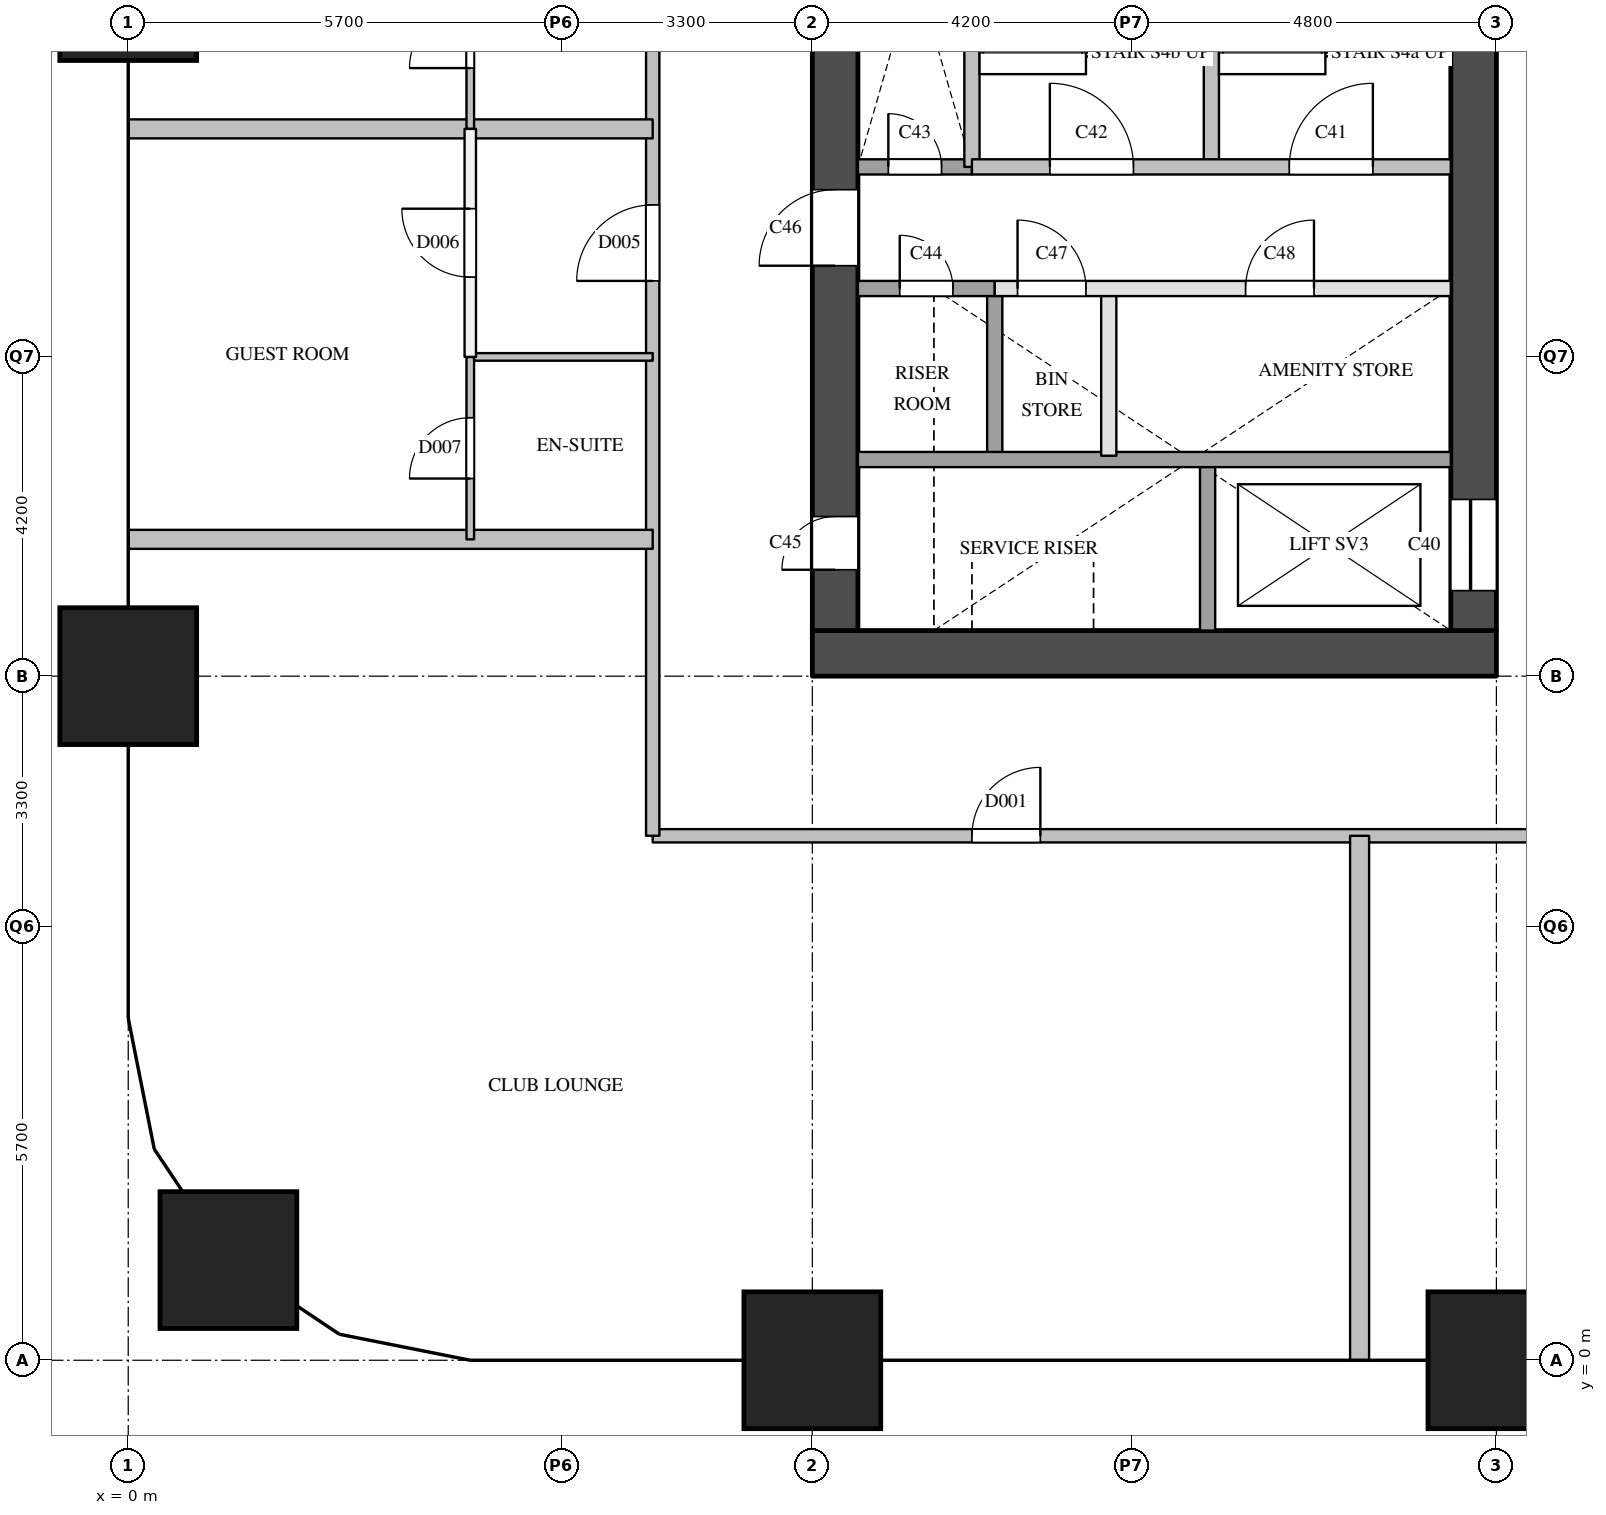
"""IFC4 building model, lengths in metres.
Left out: names, types, materials, properties, quantities, classifications, styles, units other than length and angle.
Written with IfcOpenShell. Run it as: python <this file> out.ifc"""

import sys

from ifc_helpers import new_model, si_unit, direction, frame, frame_2d, origin, origin_2d, place, context, subcontext, project, spatial, rectangle, extrude, element, fill, save


model = new_model("IFC4")
c1 = context("Model", 3, precision=1e-05, world=origin(), true_north=direction((0.0, 1.0)))
c2 = subcontext(c1, "Body", "Model", "MODEL_VIEW")
j1 = project(units=[si_unit("LENGTHUNIT", "METRE"), si_unit("PLANEANGLEUNIT", "RADIAN")], contexts=[c1])
p1 = place(None, origin())
s1 = spatial("IfcSite", under=j1, at=p1, CompositionType="ELEMENT")
p2 = place(p1, origin())
s2 = spatial("IfcBuilding", under=s1, at=p2, CompositionType="ELEMENT")
p3 = place(p2, frame((0.0, 0.0, 61.4)))
s3 = spatial("IfcBuildingStorey", under=s2, at=p3, CompositionType="ELEMENT", Elevation=61.4)
for number, where, z_axis, x_axis in (
    (1, (1.318, 1.318, 0.0), (0.0, 0.0, 1.0), (1.0, 0.0, 0.0)),
    (2, (0.0, 9.0, 0.0), (0.0, 0.0, 1.0), (1.0, 0.0, 0.0)),
    (3, (0.0, 18.0, 0.0), (0.0, 0.0, 1.0), (1.0, 0.0, 0.0)),
    (4, (9.0, 0.0, 0.0), (0.0, 0.0, 1.0), (1.0, 0.0, 0.0)),
    (5, (18.0, 0.0, 0.0), (0.0, 0.0, 1.0), (1.0, 0.0, 0.0)),
):
    element("IfcColumn", number, at=place(p3, frame(where, z_axis=z_axis, x_axis=x_axis)), inside=s3, PredefinedType="COLUMN", context=c2, shape_type="SweptSolid", body=[
        extrude(rectangle(XDim=1.8, YDim=1.8, at=origin_2d()), origin(), (0.0, 0.0, 1.0), 3.8),
    ])
p4 = place(p3, frame((9.0, 9.3, 0.0), z_axis=(0.0, 0.0, 1.0), x_axis=(1.0, 0.0, 0.0)))
e6 = element("IfcWall", 6, at=p4, inside=s3, PredefinedType="SHEAR", context=c2, shape_type="SweptSolid", body=[
    extrude(rectangle(XDim=9.0, YDim=0.6, at=frame_2d((4.5, 0.0))), origin(), (0.0, 0.0, 1.0), 3.5),
])
p5 = place(p3, frame((9.3, 9.6, 0.0), z_axis=(0.0, 0.0, 1.0), x_axis=(0.0, 1.0, 0.0)))
e7 = element("IfcWall", 7, at=p5, inside=s3, PredefinedType="SHEAR", context=c2, shape_type="SweptSolid", body=[
    extrude(rectangle(XDim=12.3, YDim=0.6, at=frame_2d((6.15, 0.0))), origin(), (0.0, 0.0, 1.0), 3.5),
])
p6 = place(p5, frame((0.8, 0.0, 0.0)))
e8 = element("IfcOpeningElement", 8, at=p6, cuts=e7, PredefinedType="OPENING", context=c2, shape_type="SweptSolid", body=[
    extrude(rectangle(XDim=0.7, YDim=2.1, at=frame_2d((0.35, 1.05))), frame((0.0, 0.31, 0.0), z_axis=(0.0, -1.0, 0.0), x_axis=(1.0, 0.0, 0.0)), (0.0, 0.0, 1.0), 0.62),
])
p7 = place(p5, frame((4.8, 0.0, 0.0)))
e9 = element("IfcOpeningElement", 9, at=p7, cuts=e7, PredefinedType="OPENING", context=c2, shape_type="SweptSolid", body=[
    extrude(rectangle(XDim=1.0, YDim=2.1, at=frame_2d((0.5, 1.05))), frame((0.0, 0.31, 0.0), z_axis=(0.0, -1.0, 0.0), x_axis=(1.0, 0.0, 0.0)), (0.0, 0.0, 1.0), 0.62),
])
p8 = place(p3, frame((17.7, 9.6, 0.0), z_axis=(0.0, 0.0, 1.0), x_axis=(0.0, 1.0, 0.0)))
e10 = element("IfcWall", 10, at=p8, inside=s3, PredefinedType="SHEAR", context=c2, shape_type="SweptSolid", body=[
    extrude(rectangle(XDim=12.3, YDim=0.6, at=frame_2d((6.15, 0.0))), origin(), (0.0, 0.0, 1.0), 3.5),
])
p9 = place(p8, frame((0.525, 0.0, 0.0)))
e11 = element("IfcOpeningElement", 11, at=p9, cuts=e10, PredefinedType="OPENING", context=c2, shape_type="SweptSolid", body=[
    extrude(rectangle(XDim=1.2, YDim=2.1, at=frame_2d((0.6, 1.05))), frame((0.0, 0.31, 0.0), z_axis=(0.0, -1.0, 0.0), x_axis=(1.0, 0.0, 0.0)), (0.0, 0.0, 1.0), 0.62),
])
p10 = place(p3, frame((11.1, 15.7, 0.0), z_axis=(0.0, 0.0, 1.0), x_axis=(0.0, 1.0, 0.0)))
e12 = element("IfcWall", 12, at=p10, inside=s3, PredefinedType="SOLIDWALL", context=c2, shape_type="SweptSolid", body=[
    extrude(rectangle(XDim=4.3, YDim=0.2, at=frame_2d((2.15, 0.0))), origin(), (0.0, 0.0, 1.0), 3.5),
])
p11 = place(p3, frame((11.4, 11.9, 0.0), z_axis=(0.0, 0.0, 1.0), x_axis=(0.0, 1.0, 0.0)))
e13 = element("IfcWall", 13, at=p11, inside=s3, PredefinedType="SOLIDWALL", context=c2, shape_type="SweptSolid", body=[
    extrude(rectangle(XDim=2.2, YDim=0.2, at=frame_2d((1.1, 0.0))), origin(), (0.0, 0.0, 1.0), 3.5),
])
p12 = place(p3, frame((12.9, 11.9, 0.0), z_axis=(0.0, 0.0, 1.0), x_axis=(0.0, 1.0, 0.0)))
e14 = element("IfcWall", 14, at=p12, inside=s3, PredefinedType="PARTITIONING", context=c2, shape_type="SweptSolid", body=[
    extrude(rectangle(XDim=2.2, YDim=0.2, at=frame_2d((1.1, 0.0))), origin(), (0.0, 0.0, 1.0), 3.5),
])
p13 = place(p3, frame((14.2, 9.6, 0.0), z_axis=(0.0, 0.0, 1.0), x_axis=(0.0, 1.0, 0.0)))
e15 = element("IfcWall", 15, at=p13, inside=s3, PredefinedType="SOLIDWALL", context=c2, shape_type="SweptSolid", body=[
    extrude(rectangle(XDim=2.3, YDim=0.2, at=frame_2d((1.15, 0.0))), origin(), (0.0, 0.0, 1.0), 3.5),
])
p14 = place(p3, frame((14.25, 15.7, 0.0), z_axis=(0.0, 0.0, 1.0), x_axis=(0.0, 1.0, 0.0)))
e16 = element("IfcWall", 16, at=p14, inside=s3, PredefinedType="SOLIDWALL", context=c2, shape_type="SweptSolid", body=[
    extrude(rectangle(XDim=4.3, YDim=0.2, at=frame_2d((2.15, 0.0))), origin(), (0.0, 0.0, 1.0), 3.5),
])
p15 = place(p3, frame((9.6, 11.85, 0.0), z_axis=(0.0, 0.0, 1.0), x_axis=(1.0, 0.0, 0.0)))
e17 = element("IfcWall", 17, at=p15, inside=s3, PredefinedType="SOLIDWALL", context=c2, shape_type="SweptSolid", body=[
    extrude(rectangle(XDim=7.8, YDim=0.2, at=frame_2d((3.9, 0.0))), origin(), (0.0, 0.0, 1.0), 3.5),
])
p16 = place(p3, frame((11.4, 14.1, 0.0), z_axis=(0.0, 0.0, 1.0), x_axis=(1.0, 0.0, 0.0)))
e18 = element("IfcWall", 18, at=p16, inside=s3, PredefinedType="PARTITIONING", context=c2, shape_type="SweptSolid", body=[
    extrude(rectangle(XDim=6.0, YDim=0.2, at=frame_2d((3.0, 0.0))), origin(), (0.0, 0.0, 1.0), 3.5),
])
p17 = place(p16, frame((0.3, 0.0, 0.0)))
e19 = element("IfcOpeningElement", 19, at=p17, cuts=e18, PredefinedType="OPENING", context=c2, shape_type="SweptSolid", body=[
    extrude(rectangle(XDim=0.9, YDim=2.1, at=frame_2d((0.45, 1.05))), frame((0.0, 0.11, 0.0), z_axis=(0.0, -1.0, 0.0), x_axis=(1.0, 0.0, 0.0)), (0.0, 0.0, 1.0), 0.22),
])
p18 = place(p16, frame((3.3, 0.0, 0.0)))
e20 = element("IfcOpeningElement", 20, at=p18, cuts=e18, PredefinedType="OPENING", context=c2, shape_type="SweptSolid", body=[
    extrude(rectangle(XDim=0.9, YDim=2.1, at=frame_2d((0.45, 1.05))), frame((0.0, 0.11, 0.0), z_axis=(0.0, -1.0, 0.0), x_axis=(1.0, 0.0, 0.0)), (0.0, 0.0, 1.0), 0.22),
])
p19 = place(p3, frame((9.6, 14.1, 0.0), z_axis=(0.0, 0.0, 1.0), x_axis=(1.0, 0.0, 0.0)))
e21 = element("IfcWall", 21, at=p19, inside=s3, PredefinedType="SOLIDWALL", context=c2, shape_type="SweptSolid", body=[
    extrude(rectangle(XDim=1.8, YDim=0.2, at=frame_2d((0.9, 0.0))), origin(), (0.0, 0.0, 1.0), 3.5),
])
p20 = place(p19, frame((0.55, 0.0, 0.0)))
e22 = element("IfcOpeningElement", 22, at=p20, cuts=e21, PredefinedType="OPENING", context=c2, shape_type="SweptSolid", body=[
    extrude(rectangle(XDim=0.7, YDim=2.1, at=frame_2d((0.35, 1.05))), frame((0.0, 0.11, 0.0), z_axis=(0.0, -1.0, 0.0), x_axis=(1.0, 0.0, 0.0)), (0.0, 0.0, 1.0), 0.22),
])
p21 = place(p3, frame((9.6, 15.7, 0.0), z_axis=(0.0, 0.0, 1.0), x_axis=(1.0, 0.0, 0.0)))
e23 = element("IfcWall", 23, at=p21, inside=s3, PredefinedType="SOLIDWALL", context=c2, shape_type="SweptSolid", body=[
    extrude(rectangle(XDim=1.5, YDim=0.2, at=frame_2d((0.75, 0.0))), origin(), (0.0, 0.0, 1.0), 3.5),
])
p22 = place(p21, frame((0.4, 0.0, 0.0)))
e24 = element("IfcOpeningElement", 24, at=p22, cuts=e23, PredefinedType="OPENING", context=c2, shape_type="SweptSolid", body=[
    extrude(rectangle(XDim=0.7, YDim=2.1, at=frame_2d((0.35, 1.05))), frame((0.0, 0.11, 0.0), z_axis=(0.0, -1.0, 0.0), x_axis=(1.0, 0.0, 0.0)), (0.0, 0.0, 1.0), 0.22),
])
p23 = place(p3, frame((11.1, 15.7, 0.0), z_axis=(0.0, 0.0, 1.0), x_axis=(1.0, 0.0, 0.0)))
e25 = element("IfcWall", 25, at=p23, inside=s3, PredefinedType="SOLIDWALL", context=c2, shape_type="SweptSolid", body=[
    extrude(rectangle(XDim=6.3, YDim=0.2, at=frame_2d((3.15, 0.0))), origin(), (0.0, 0.0, 1.0), 3.5),
])
p24 = place(p23, frame((4.175, 0.0, 0.0)))
e26 = element("IfcOpeningElement", 26, at=p24, cuts=e25, PredefinedType="OPENING", context=c2, shape_type="SweptSolid", body=[
    extrude(rectangle(XDim=1.1, YDim=2.1, at=frame_2d((0.55, 1.05))), frame((0.0, 0.11, 0.0), z_axis=(0.0, -1.0, 0.0), x_axis=(1.0, 0.0, 0.0)), (0.0, 0.0, 1.0), 0.22),
])
p25 = place(p23, frame((1.025, 0.0, 0.0)))
e27 = element("IfcOpeningElement", 27, at=p25, cuts=e25, PredefinedType="OPENING", context=c2, shape_type="SweptSolid", body=[
    extrude(rectangle(XDim=1.1, YDim=2.1, at=frame_2d((0.55, 1.05))), frame((0.0, 0.11, 0.0), z_axis=(0.0, -1.0, 0.0), x_axis=(1.0, 0.0, 0.0)), (0.0, 0.0, 1.0), 0.22),
])
p26 = place(p3, frame((6.9, 6.9, 0.0), z_axis=(0.0, 0.0, 1.0), x_axis=(1.0, 0.0, 0.0)))
e28 = element("IfcWall", 28, at=p26, inside=s3, PredefinedType="PARTITIONING", context=c2, shape_type="SweptSolid", body=[
    extrude(rectangle(XDim=13.2, YDim=0.175, at=frame_2d((6.6, 0.0))), origin(), (0.0, 0.0, 1.0), 3.5),
])
p27 = place(p26, frame((4.2, 0.0, 0.0)))
e29 = element("IfcOpeningElement", 29, at=p27, cuts=e28, PredefinedType="OPENING", context=c2, shape_type="SweptSolid", body=[
    extrude(rectangle(XDim=0.9, YDim=2.1, at=frame_2d((0.45, 1.05))), frame((0.0, 0.097, 0.0), z_axis=(0.0, -1.0, 0.0), x_axis=(1.0, 0.0, 0.0)), (0.0, 0.0, 1.0), 0.195),
])
p28 = place(p3, frame((6.9, 6.9, 0.0), z_axis=(0.0, 0.0, 1.0), x_axis=(0.0, 1.0, 0.0)))
e30 = element("IfcWall", 30, at=p28, inside=s3, PredefinedType="PARTITIONING", context=c2, shape_type="SweptSolid", body=[
    extrude(rectangle(XDim=17.09, YDim=0.175, at=frame_2d((8.545, 0.0))), origin(), (0.0, 0.0, 1.0), 3.5),
])
p29 = place(p28, frame((7.3, 0.0, 0.0)))
e31 = element("IfcOpeningElement", 31, at=p29, cuts=e30, PredefinedType="OPENING", context=c2, shape_type="SweptSolid", body=[
    extrude(rectangle(XDim=1.0, YDim=2.1, at=frame_2d((0.5, 1.05))), frame((0.0, 0.097, 0.0), z_axis=(0.0, -1.0, 0.0), x_axis=(1.0, 0.0, 0.0)), (0.0, 0.0, 1.0), 0.195),
])
p30 = place(p28, frame((13.895, 0.0, 0.0)))
e32 = element("IfcOpeningElement", 32, at=p30, cuts=e30, PredefinedType="OPENING", context=c2, shape_type="SweptSolid", body=[
    extrude(rectangle(XDim=1.0, YDim=2.1, at=frame_2d((0.5, 1.05))), frame((0.0, 0.097, 0.0), z_axis=(0.0, -1.0, 0.0), x_axis=(1.0, 0.0, 0.0)), (0.0, 0.0, 1.0), 0.195),
])
p31 = place(p3, frame((4.5, 13.2, 0.0), z_axis=(0.0, 0.0, 1.0), x_axis=(0.0, 1.0, 0.0)))
e33 = element("IfcWall", 33, at=p31, inside=s3, PredefinedType="PARTITIONING", context=c2, shape_type="SweptSolid", body=[
    extrude(rectangle(XDim=3.0, YDim=0.15, at=frame_2d((1.5, 0.0))), origin(), (0.0, 0.0, 1.0), 3.5),
])
p32 = place(p31, frame((1.05, 0.0, 0.0)))
e34 = element("IfcOpeningElement", 34, at=p32, cuts=e33, PredefinedType="OPENING", context=c2, shape_type="SweptSolid", body=[
    extrude(rectangle(XDim=0.9, YDim=2.1, at=frame_2d((0.45, 1.05))), frame((0.0, 0.085, 0.0), z_axis=(0.0, -1.0, 0.0), x_axis=(1.0, 0.0, 0.0)), (0.0, 0.0, 1.0), 0.17),
])
for number, where, z_axis, x_axis in (
    (35, (0.0, 10.8, 0.0), (0.0, 0.0, 1.0), (1.0, 0.0, 0.0)),
    (36, (0.0, 16.2, 0.0), (0.0, 0.0, 1.0), (1.0, 0.0, 0.0)),
    (37, (16.2, 0.0, 0.0), (0.0, 0.0, 1.0), (0.0, 1.0, 0.0)),
):
    element("IfcWall", number, at=place(p3, frame(where, z_axis=z_axis, x_axis=x_axis)), inside=s3, PredefinedType="PARTITIONING", context=c2, shape_type="SweptSolid", body=[
        extrude(rectangle(XDim=6.9, YDim=0.25, at=frame_2d((3.45, 0.0))), origin(), (0.0, 0.0, 1.0), 2.5),
    ])
p33 = place(p3, frame((4.5, 13.2, 0.0), z_axis=(0.0, 0.0, 1.0), x_axis=(1.0, 0.0, 0.0)))
e38 = element("IfcWall", 38, at=p33, inside=s3, PredefinedType="PARTITIONING", context=c2, shape_type="SweptSolid", body=[
    extrude(rectangle(XDim=2.4, YDim=0.1, at=frame_2d((1.2, 0.0))), origin(), (0.0, 0.0, 1.0), 3.5),
])
p34 = place(p3, frame((4.5, 10.8, 0.0), z_axis=(0.0, 0.0, 1.0), x_axis=(0.0, 1.0, 0.0)))
e39 = element("IfcWall", 39, at=p34, inside=s3, PredefinedType="PARTITIONING", context=c2, shape_type="SweptSolid", body=[
    extrude(rectangle(XDim=2.4, YDim=0.1, at=frame_2d((1.2, 0.0))), origin(), (0.0, 0.0, 1.0), 3.5),
])
p35 = place(p34, frame((0.8, 0.0, 0.0)))
e40 = element("IfcOpeningElement", 40, at=p35, cuts=e39, PredefinedType="OPENING", context=c2, shape_type="SweptSolid", body=[
    extrude(rectangle(XDim=0.8, YDim=2.1, at=frame_2d((0.4, 1.05))), frame((0.0, 0.06, 0.0), z_axis=(0.0, -1.0, 0.0), x_axis=(1.0, 0.0, 0.0)), (0.0, 0.0, 1.0), 0.12),
])
p36 = place(p3, frame((4.5, 16.2, 0.0), z_axis=(0.0, 0.0, 1.0), x_axis=(0.0, 1.0, 0.0)))
e41 = element("IfcWall", 41, at=p36, inside=s3, PredefinedType="PARTITIONING", context=c2, shape_type="SweptSolid", body=[
    extrude(rectangle(XDim=2.4, YDim=0.1, at=frame_2d((1.2, 0.0))), origin(), (0.0, 0.0, 1.0), 3.5),
])
p37 = place(p36, frame((0.8, 0.0, 0.0)))
e42 = element("IfcOpeningElement", 42, at=p37, cuts=e41, PredefinedType="OPENING", context=c2, shape_type="SweptSolid", body=[
    extrude(rectangle(XDim=0.8, YDim=2.1, at=frame_2d((0.4, 1.05))), frame((0.0, 0.06, 0.0), z_axis=(0.0, -1.0, 0.0), x_axis=(1.0, 0.0, 0.0)), (0.0, 0.0, 1.0), 0.12),
])
p38 = place(p9, origin())
e43 = element("IfcDoor", 43, at=p38, inside=s3, OperationType="SLIDING_TO_LEFT", PredefinedType="DOOR", context=c2, shape_type="SweptSolid", body=[
    extrude(rectangle(XDim=1.2, YDim=2.1, at=frame_2d((0.6, 1.05))), frame((0.0, 0.025, 0.0), z_axis=(0.0, -1.0, 0.0), x_axis=(1.0, 0.0, 0.0)), (0.0, 0.0, 1.0), 0.05),
])
fill(e11, e43)
p39 = place(p24, origin())
e44 = element("IfcDoor", 44, at=p39, inside=s3, OperationType="SINGLE_SWING_RIGHT", PredefinedType="DOOR", context=c2, shape_type="SweptSolid", body=[
    extrude(rectangle(XDim=1.1, YDim=2.1, at=frame_2d((0.55, 1.05))), frame((0.0, 0.025, 0.0), z_axis=(0.0, -1.0, 0.0), x_axis=(1.0, 0.0, 0.0)), (0.0, 0.0, 1.0), 0.05),
])
fill(e26, e44)
p40 = place(p25, origin())
e45 = element("IfcDoor", 45, at=p40, inside=s3, OperationType="SINGLE_SWING_LEFT", PredefinedType="DOOR", context=c2, shape_type="SweptSolid", body=[
    extrude(rectangle(XDim=1.1, YDim=2.1, at=frame_2d((0.55, 1.05))), frame((0.0, 0.025, 0.0), z_axis=(0.0, -1.0, 0.0), x_axis=(1.0, 0.0, 0.0)), (0.0, 0.0, 1.0), 0.05),
])
fill(e27, e45)
p41 = place(p22, origin())
e46 = element("IfcDoor", 46, at=p41, inside=s3, OperationType="SINGLE_SWING_LEFT", PredefinedType="DOOR", context=c2, shape_type="SweptSolid", body=[
    extrude(rectangle(XDim=0.7, YDim=2.1, at=frame_2d((0.35, 1.05))), frame((0.0, 0.025, 0.0), z_axis=(0.0, -1.0, 0.0), x_axis=(1.0, 0.0, 0.0)), (0.0, 0.0, 1.0), 0.05),
])
fill(e24, e46)
p42 = place(p20, origin())
e47 = element("IfcDoor", 47, at=p42, inside=s3, OperationType="SINGLE_SWING_LEFT", PredefinedType="DOOR", context=c2, shape_type="SweptSolid", body=[
    extrude(rectangle(XDim=0.7, YDim=2.1, at=frame_2d((0.35, 1.05))), frame((0.0, 0.025, 0.0), z_axis=(0.0, -1.0, 0.0), x_axis=(1.0, 0.0, 0.0)), (0.0, 0.0, 1.0), 0.05),
])
fill(e22, e47)
p43 = place(p6, origin())
e48 = element("IfcDoor", 48, at=p43, inside=s3, OperationType="SINGLE_SWING_LEFT", PredefinedType="DOOR", context=c2, shape_type="SweptSolid", body=[
    extrude(rectangle(XDim=0.7, YDim=2.1, at=frame_2d((0.35, 1.05))), frame((0.0, 0.025, 0.0), z_axis=(0.0, -1.0, 0.0), x_axis=(1.0, 0.0, 0.0)), (0.0, 0.0, 1.0), 0.05),
])
fill(e8, e48)
p44 = place(p7, origin())
e49 = element("IfcDoor", 49, at=p44, inside=s3, OperationType="SINGLE_SWING_LEFT", PredefinedType="DOOR", context=c2, shape_type="SweptSolid", body=[
    extrude(rectangle(XDim=1.0, YDim=2.1, at=frame_2d((0.5, 1.05))), frame((0.0, 0.025, 0.0), z_axis=(0.0, -1.0, 0.0), x_axis=(1.0, 0.0, 0.0)), (0.0, 0.0, 1.0), 0.05),
])
fill(e9, e49)
p45 = place(p17, origin())
e50 = element("IfcDoor", 50, at=p45, inside=s3, OperationType="SINGLE_SWING_LEFT", PredefinedType="DOOR", context=c2, shape_type="SweptSolid", body=[
    extrude(rectangle(XDim=0.9, YDim=2.1, at=frame_2d((0.45, 1.05))), frame((0.0, 0.025, 0.0), z_axis=(0.0, -1.0, 0.0), x_axis=(1.0, 0.0, 0.0)), (0.0, 0.0, 1.0), 0.05),
])
fill(e19, e50)
p46 = place(p18, origin())
e51 = element("IfcDoor", 51, at=p46, inside=s3, OperationType="SINGLE_SWING_RIGHT", PredefinedType="DOOR", context=c2, shape_type="SweptSolid", body=[
    extrude(rectangle(XDim=0.9, YDim=2.1, at=frame_2d((0.45, 1.05))), frame((0.0, 0.025, 0.0), z_axis=(0.0, -1.0, 0.0), x_axis=(1.0, 0.0, 0.0)), (0.0, 0.0, 1.0), 0.05),
])
fill(e20, e51)
p47 = place(p27, origin())
e52 = element("IfcDoor", 52, at=p47, inside=s3, OperationType="SINGLE_SWING_RIGHT", PredefinedType="DOOR", context=c2, shape_type="SweptSolid", body=[
    extrude(rectangle(XDim=0.9, YDim=2.1, at=frame_2d((0.45, 1.05))), frame((0.0, 0.025, 0.0), z_axis=(0.0, -1.0, 0.0), x_axis=(1.0, 0.0, 0.0)), (0.0, 0.0, 1.0), 0.05),
])
fill(e29, e52)
p48 = place(p29, origin())
e53 = element("IfcDoor", 53, at=p48, inside=s3, OperationType="SINGLE_SWING_LEFT", PredefinedType="DOOR", context=c2, shape_type="SweptSolid", body=[
    extrude(rectangle(XDim=1.0, YDim=2.1, at=frame_2d((0.5, 1.05))), frame((0.0, 0.025, 0.0), z_axis=(0.0, -1.0, 0.0), x_axis=(1.0, 0.0, 0.0)), (0.0, 0.0, 1.0), 0.05),
])
fill(e31, e53)
p49 = place(p32, origin())
e54 = element("IfcDoor", 54, at=p49, inside=s3, OperationType="SINGLE_SWING_RIGHT", PredefinedType="DOOR", context=c2, shape_type="SweptSolid", body=[
    extrude(rectangle(XDim=0.9, YDim=2.1, at=frame_2d((0.45, 1.05))), frame((0.0, 0.025, 0.0), z_axis=(0.0, -1.0, 0.0), x_axis=(1.0, 0.0, 0.0)), (0.0, 0.0, 1.0), 0.05),
])
fill(e34, e54)
p50 = place(p35, origin())
e55 = element("IfcDoor", 55, at=p50, inside=s3, OperationType="SINGLE_SWING_LEFT", PredefinedType="DOOR", context=c2, shape_type="SweptSolid", body=[
    extrude(rectangle(XDim=0.8, YDim=2.1, at=frame_2d((0.4, 1.05))), frame((0.0, 0.025, 0.0), z_axis=(0.0, -1.0, 0.0), x_axis=(1.0, 0.0, 0.0)), (0.0, 0.0, 1.0), 0.05),
])
fill(e40, e55)
p51 = place(p37, origin())
e56 = element("IfcDoor", 56, at=p51, inside=s3, OperationType="SINGLE_SWING_LEFT", PredefinedType="DOOR", context=c2, shape_type="SweptSolid", body=[
    extrude(rectangle(XDim=0.8, YDim=2.1, at=frame_2d((0.4, 1.05))), frame((0.0, 0.025, 0.0), z_axis=(0.0, -1.0, 0.0), x_axis=(1.0, 0.0, 0.0)), (0.0, 0.0, 1.0), 0.05),
])
fill(e42, e56)
save(model, sys.argv[1])
